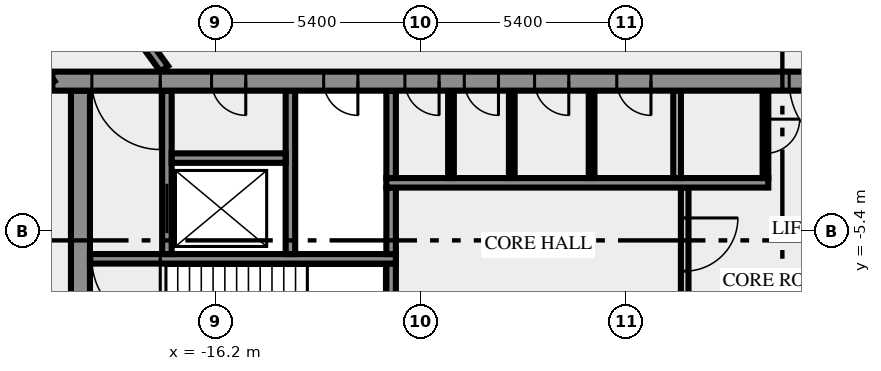
"""IFC4 building model, lengths in metres.
Left out: names, types, materials, properties, quantities, classifications, styles, units other than length and angle.
Written with IfcOpenShell. Run it as: python <this file> out.ifc"""

import sys

from ifc_helpers import new_model, si_unit, direction, frame, frame_2d, origin, place, context, subcontext, project, spatial, rectangle, extrude, element, fill, save


model = new_model("IFC4")
c1 = context("Model", 3, precision=1e-05, world=origin(), true_north=direction((0.0, 1.0)))
c2 = subcontext(c1, "Body", "Model", "MODEL_VIEW")
j1 = project(units=[si_unit("LENGTHUNIT", "METRE"), si_unit("PLANEANGLEUNIT", "RADIAN")], contexts=[c1])
p1 = place(None, origin())
s1 = spatial("IfcSite", under=j1, at=p1, CompositionType="ELEMENT")
p2 = place(p1, origin())
s2 = spatial("IfcBuilding", under=s1, at=p2, CompositionType="ELEMENT")
p3 = place(p2, frame((0.0, 0.0, 184.0)))
s3 = spatial("IfcBuildingStorey", under=s2, at=p3, CompositionType="ELEMENT", Elevation=184.0)
p4 = place(p3, frame((-19.75, -10.5, 0.0), z_axis=(0.0, 0.0, 1.0), x_axis=(0.0, 1.0, 0.0)))
e1 = element("IfcWall", 1, at=p4, inside=s3, PredefinedType="SHEAR", context=c2, shape_type="SweptSolid", body=[
    extrude(rectangle(XDim=8.8, YDim=0.5, at=frame_2d((4.4, 0.0))), origin(), (0.0, 0.0, 1.0), 3.4),
])
p5 = place(p3, frame((-11.575, -7.25, 0.0), z_axis=(0.0, 0.0, 1.0), x_axis=(0.0, 1.0, 0.0)))
e2 = element("IfcWall", 2, at=p5, inside=s3, PredefinedType="SHEAR", context=c2, shape_type="SweptSolid", body=[
    extrude(rectangle(XDim=1.0, YDim=0.25, at=frame_2d((0.5, 0.0))), origin(), (0.0, 0.0, 1.0), 3.4),
])
p6 = place(p3, frame((-3.85, -4.25, 0.0), z_axis=(0.0, 0.0, 1.0), x_axis=(0.0, -1.0, 0.0)))
e3 = element("IfcWall", 3, at=p6, inside=s3, PredefinedType="SOLIDWALL", context=c2, shape_type="SweptSolid", body=[
    extrude(rectangle(XDim=3.0, YDim=0.2, at=frame_2d((1.5, 0.0))), origin(), (0.0, 0.0, 1.0), 3.4),
])
p7 = place(p6, frame((0.8, 0.0, 0.0)))
e4 = element("IfcOpeningElement", 4, at=p7, cuts=e3, PredefinedType="OPENING", context=c2, shape_type="SweptSolid", body=[
    extrude(rectangle(XDim=1.4, YDim=2.1, at=frame_2d((0.7, 1.05))), frame((0.0, 0.11, 0.0), z_axis=(0.0, -1.0, 0.0), x_axis=(1.0, 0.0, 0.0)), (0.0, 0.0, 1.0), 0.22),
])
p8 = place(p3, frame((-11.45, -6.125, 0.0), z_axis=(0.0, 0.0, 1.0), x_axis=(-1.0, 0.0, 0.0)))
e5 = element("IfcWall", 5, at=p8, inside=s3, PredefinedType="SHEAR", context=c2, shape_type="SweptSolid", body=[
    extrude(rectangle(XDim=8.05, YDim=0.25, at=frame_2d((4.025, 0.0))), origin(), (0.0, 0.0, 1.0), 3.4),
])
p9 = place(p8, frame((6.2, 0.0, 0.0)))
e6 = element("IfcOpeningElement", 6, at=p9, cuts=e5, PredefinedType="OPENING", context=c2, shape_type="SweptSolid", body=[
    extrude(rectangle(XDim=1.8, YDim=2.1, at=frame_2d((0.9, 1.05))), frame((0.0, 0.135, 0.0), z_axis=(0.0, -1.0, 0.0), x_axis=(1.0, 0.0, 0.0)), (0.0, 0.0, 1.0), 0.27),
])
p10 = place(p3, frame((-17.475, -6.0, 0.0), z_axis=(0.0, 0.0, 1.0), x_axis=(0.0, 1.0, 0.0)))
e7 = element("IfcWall", 7, at=p10, inside=s3, PredefinedType="SHEAR", context=c2, shape_type="SweptSolid", body=[
    extrude(rectangle(XDim=4.3, YDim=0.25, at=frame_2d((2.15, 0.0))), origin(), (0.0, 0.0, 1.0), 3.4),
])
p11 = place(p10, frame((0.55, 0.0, 0.0)))
e8 = element("IfcOpeningElement", 8, at=p11, cuts=e7, PredefinedType="OPENING", context=c2, shape_type="SweptSolid", body=[
    extrude(rectangle(XDim=1.3, YDim=2.1, at=frame_2d((0.65, 1.05))), frame((0.0, 0.135, 0.0), z_axis=(0.0, -1.0, 0.0), x_axis=(1.0, 0.0, 0.0)), (0.0, 0.0, 1.0), 0.27),
])
p12 = place(p3, frame((-14.225, -6.0, 0.0), z_axis=(0.0, 0.0, 1.0), x_axis=(0.0, 1.0, 0.0)))
e9 = element("IfcWall", 9, at=p12, inside=s3, PredefinedType="SHEAR", context=c2, shape_type="SweptSolid", body=[
    extrude(rectangle(XDim=4.3, YDim=0.25, at=frame_2d((2.15, 0.0))), origin(), (0.0, 0.0, 1.0), 3.4),
])
p13 = place(p3, frame((-11.575, -6.0, 0.0), z_axis=(0.0, 0.0, 1.0), x_axis=(0.0, 1.0, 0.0)))
e10 = element("IfcWall", 10, at=p13, inside=s3, PredefinedType="SHEAR", context=c2, shape_type="SweptSolid", body=[
    extrude(rectangle(XDim=1.75, YDim=0.25, at=frame_2d((0.875, 0.0))), origin(), (0.0, 0.0, 1.0), 3.4),
])
p14 = place(p3, frame((-11.7, -4.125, 0.0), z_axis=(0.0, 0.0, 1.0), x_axis=(1.0, 0.0, 0.0)))
e11 = element("IfcWall", 11, at=p14, inside=s3, PredefinedType="SHEAR", context=c2, shape_type="SweptSolid", body=[
    extrude(rectangle(XDim=10.05, YDim=0.25, at=frame_2d((5.025, 0.0))), origin(), (0.0, 0.0, 1.0), 3.4),
])
p15 = place(p3, frame((-11.575, -4.0, 0.0), z_axis=(0.0, 0.0, 1.0), x_axis=(0.0, 1.0, 0.0)))
e12 = element("IfcWall", 12, at=p15, inside=s3, PredefinedType="SHEAR", context=c2, shape_type="SweptSolid", body=[
    extrude(rectangle(XDim=2.3, YDim=0.25, at=frame_2d((1.15, 0.0))), origin(), (0.0, 0.0, 1.0), 3.4),
])
for number, where, z_axis, x_axis in (
    (13, (-10.0, -4.0, 0.0), (0.0, 0.0, 1.0), (0.0, 1.0, 0.0)),
    (14, (-8.4, -4.0, 0.0), (0.0, 0.0, 1.0), (0.0, 1.0, 0.0)),
    (15, (-6.3, -4.0, 0.0), (0.0, 0.0, 1.0), (0.0, 1.0, 0.0)),
):
    element("IfcWall", number, at=place(p3, frame(where, z_axis=z_axis, x_axis=x_axis)), inside=s3, PredefinedType="PARTITIONING", context=c2, shape_type="SweptSolid", body=[
        extrude(rectangle(XDim=2.3, YDim=0.15, at=frame_2d((1.15, 0.0))), origin(), (0.0, 0.0, 1.0), 3.4),
    ])
p16 = place(p3, frame((-4.05, -4.0, 0.0), z_axis=(0.0, 0.0, 1.0), x_axis=(0.0, 1.0, 0.0)))
e16 = element("IfcWall", 16, at=p16, inside=s3, PredefinedType="SOLIDWALL", context=c2, shape_type="SweptSolid", body=[
    extrude(rectangle(XDim=2.3, YDim=0.2, at=frame_2d((1.15, 0.0))), origin(), (0.0, 0.0, 1.0), 3.4),
])
p17 = place(p3, frame((-1.725, -1.7, 0.0), z_axis=(0.0, 0.0, 1.0), x_axis=(0.0, -1.0, 0.0)))
e17 = element("IfcWall", 17, at=p17, inside=s3, PredefinedType="PARTITIONING", context=c2, shape_type="SweptSolid", body=[
    extrude(rectangle(XDim=2.3, YDim=0.15, at=frame_2d((1.15, 0.0))), origin(), (0.0, 0.0, 1.0), 3.4),
])
p18 = place(p17, frame((0.75, 0.0, 0.0)))
e18 = element("IfcOpeningElement", 18, at=p18, cuts=e17, PredefinedType="OPENING", context=c2, shape_type="SweptSolid", body=[
    extrude(rectangle(XDim=0.9, YDim=2.1, at=frame_2d((0.45, 1.05))), frame((0.0, 0.085, 0.0), z_axis=(0.0, -1.0, 0.0), x_axis=(1.0, 0.0, 0.0)), (0.0, 0.0, 1.0), 0.17),
])
p19 = place(p3, frame((-17.35, -3.475, 0.0), z_axis=(0.0, 0.0, 1.0), x_axis=(1.0, 0.0, 0.0)))
e19 = element("IfcWall", 19, at=p19, inside=s3, PredefinedType="SHEAR", context=c2, shape_type="SweptSolid", body=[
    extrude(rectangle(XDim=3.0, YDim=0.25, at=frame_2d((1.5, 0.0))), origin(), (0.0, 0.0, 1.0), 3.4),
])
p20 = place(p3, frame((20.49, -1.45, 0.0), z_axis=(0.0, 0.0, 1.0), x_axis=(-1.0, 0.0, 0.0)))
e20 = element("IfcWall", 20, at=p20, inside=s3, PredefinedType="SHEAR", context=c2, shape_type="SweptSolid", body=[
    extrude(rectangle(XDim=40.98, YDim=0.5, at=frame_2d((20.49, 0.0))), origin(), (0.0, 0.0, 1.0), 3.4),
])
p21 = place(p20, frame((38.14, 0.0, 0.0)))
e21 = element("IfcOpeningElement", 21, at=p21, cuts=e20, PredefinedType="OPENING", context=c2, shape_type="SweptSolid", body=[
    extrude(rectangle(XDim=1.8, YDim=2.1, at=frame_2d((0.9, 1.05))), frame((0.0, 0.26, 0.0), z_axis=(0.0, -1.0, 0.0), x_axis=(1.0, 0.0, 0.0)), (0.0, 0.0, 1.0), 0.52),
])
p22 = place(p20, frame((35.89, 0.0, 0.0)))
e22 = element("IfcOpeningElement", 22, at=p22, cuts=e20, PredefinedType="OPENING", context=c2, shape_type="SweptSolid", body=[
    extrude(rectangle(XDim=0.9, YDim=2.1, at=frame_2d((0.45, 1.05))), frame((0.0, 0.26, 0.0), z_axis=(0.0, -1.0, 0.0), x_axis=(1.0, 0.0, 0.0)), (0.0, 0.0, 1.0), 0.52),
])
p23 = place(p20, frame((32.94, 0.0, 0.0)))
e23 = element("IfcOpeningElement", 23, at=p23, cuts=e20, PredefinedType="OPENING", context=c2, shape_type="SweptSolid", body=[
    extrude(rectangle(XDim=0.9, YDim=2.1, at=frame_2d((0.45, 1.05))), frame((0.0, 0.26, 0.0), z_axis=(0.0, -1.0, 0.0), x_axis=(1.0, 0.0, 0.0)), (0.0, 0.0, 1.0), 0.52),
])
p24 = place(p20, frame((30.802, 0.0, 0.0)))
e24 = element("IfcOpeningElement", 24, at=p24, cuts=e20, PredefinedType="OPENING", context=c2, shape_type="SweptSolid", body=[
    extrude(rectangle(XDim=0.9, YDim=2.1, at=frame_2d((0.45, 1.05))), frame((0.0, 0.26, 0.0), z_axis=(0.0, -1.0, 0.0), x_axis=(1.0, 0.0, 0.0)), (0.0, 0.0, 1.0), 0.52),
])
p25 = place(p20, frame((29.24, 0.0, 0.0)))
e25 = element("IfcOpeningElement", 25, at=p25, cuts=e20, PredefinedType="OPENING", context=c2, shape_type="SweptSolid", body=[
    extrude(rectangle(XDim=0.9, YDim=2.1, at=frame_2d((0.45, 1.05))), frame((0.0, 0.26, 0.0), z_axis=(0.0, -1.0, 0.0), x_axis=(1.0, 0.0, 0.0)), (0.0, 0.0, 1.0), 0.52),
])
p26 = place(p20, frame((27.39, 0.0, 0.0)))
e26 = element("IfcOpeningElement", 26, at=p26, cuts=e20, PredefinedType="OPENING", context=c2, shape_type="SweptSolid", body=[
    extrude(rectangle(XDim=0.9, YDim=2.1, at=frame_2d((0.45, 1.05))), frame((0.0, 0.26, 0.0), z_axis=(0.0, -1.0, 0.0), x_axis=(1.0, 0.0, 0.0)), (0.0, 0.0, 1.0), 0.52),
])
p27 = place(p20, frame((25.228, 0.0, 0.0)))
e27 = element("IfcOpeningElement", 27, at=p27, cuts=e20, PredefinedType="OPENING", context=c2, shape_type="SweptSolid", body=[
    extrude(rectangle(XDim=0.9, YDim=2.1, at=frame_2d((0.45, 1.05))), frame((0.0, 0.26, 0.0), z_axis=(0.0, -1.0, 0.0), x_axis=(1.0, 0.0, 0.0)), (0.0, 0.0, 1.0), 0.52),
])
p28 = place(p20, frame((19.59, 0.0, 0.0)))
e28 = element("IfcOpeningElement", 28, at=p28, cuts=e20, PredefinedType="OPENING", context=c2, shape_type="SweptSolid", body=[
    extrude(rectangle(XDim=2.0, YDim=2.1, at=frame_2d((1.0, 1.05))), frame((0.0, 0.26, 0.0), z_axis=(0.0, -1.0, 0.0), x_axis=(1.0, 0.0, 0.0)), (0.0, 0.0, 1.0), 0.52),
])
p29 = place(p20, frame((7.14, 0.0, 0.0)))
e29 = element("IfcOpeningElement", 29, at=p29, cuts=e20, PredefinedType="OPENING", context=c2, shape_type="SweptSolid", body=[
    extrude(rectangle(XDim=0.9, YDim=2.1, at=frame_2d((0.45, 1.05))), frame((0.0, 0.26, 0.0), z_axis=(0.0, -1.0, 0.0), x_axis=(1.0, 0.0, 0.0)), (0.0, 0.0, 1.0), 0.52),
])
p30 = place(p20, frame((5.028, 0.0, 0.0)))
e30 = element("IfcOpeningElement", 30, at=p30, cuts=e20, PredefinedType="OPENING", context=c2, shape_type="SweptSolid", body=[
    extrude(rectangle(XDim=0.8, YDim=2.1, at=frame_2d((0.4, 1.05))), frame((0.0, 0.26, 0.0), z_axis=(0.0, -1.0, 0.0), x_axis=(1.0, 0.0, 0.0)), (0.0, 0.0, 1.0), 0.52),
])
p31 = place(p20, frame((3.452, 0.0, 0.0)))
e31 = element("IfcOpeningElement", 31, at=p31, cuts=e20, PredefinedType="OPENING", context=c2, shape_type="SweptSolid", body=[
    extrude(rectangle(XDim=0.8, YDim=2.1, at=frame_2d((0.4, 1.05))), frame((0.0, 0.26, 0.0), z_axis=(0.0, -1.0, 0.0), x_axis=(1.0, 0.0, 0.0)), (0.0, 0.0, 1.0), 0.52),
])
p32 = place(p20, frame((1.04, 0.0, 0.0)))
e32 = element("IfcOpeningElement", 32, at=p32, cuts=e20, PredefinedType="OPENING", context=c2, shape_type="SweptSolid", body=[
    extrude(rectangle(XDim=1.8, YDim=2.1, at=frame_2d((0.9, 1.05))), frame((0.0, 0.26, 0.0), z_axis=(0.0, -1.0, 0.0), x_axis=(1.0, 0.0, 0.0)), (0.0, 0.0, 1.0), 0.52),
])
p33 = place(p3, frame((-20.531, -1.523, 0.0), z_axis=(0.0, 0.0, 1.0), x_axis=(-0.587784239999, 0.809017729849, 0.0)))
e33 = element("IfcWall", 33, at=p33, inside=s3, PredefinedType="SOLIDWALL", context=c2, shape_type="SweptSolid", body=[
    extrude(rectangle(XDim=23.271, YDim=0.25, at=frame_2d((11.635, 0.0))), origin(), (0.0, 0.0, 1.0), 3.4),
])
p34 = place(p33, frame((15.916, 0.0, 0.0)))
e34 = element("IfcOpeningElement", 34, at=p34, cuts=e33, PredefinedType="OPENING", context=c2, shape_type="SweptSolid", body=[
    extrude(rectangle(XDim=0.9, YDim=2.1, at=frame_2d((0.45, 1.05))), frame((0.0, 0.135, 0.0), z_axis=(0.0, -1.0, 0.0), x_axis=(1.0, 0.0, 0.0)), (0.0, 0.0, 1.0), 0.27),
])
p35 = place(p33, frame((6.974, 0.0, 0.0)))
e35 = element("IfcOpeningElement", 35, at=p35, cuts=e33, PredefinedType="OPENING", context=c2, shape_type="SweptSolid", body=[
    extrude(rectangle(XDim=1.8, YDim=2.1, at=frame_2d((0.9, 1.05))), frame((0.0, 0.135, 0.0), z_axis=(0.0, -1.0, 0.0), x_axis=(1.0, 0.0, 0.0)), (0.0, 0.0, 1.0), 0.27),
])
p36 = place(p3, frame((-31.918, 18.658, 0.0), z_axis=(0.0, 0.0, 1.0), x_axis=(0.587788731405, -0.80901446664, 0.0)))
e36 = element("IfcWall", 36, at=p36, inside=s3, PredefinedType="SOLIDWALL", context=c2, shape_type="SweptSolid", body=[
    extrude(rectangle(XDim=24.453, YDim=0.25, at=frame_2d((12.227, 0.0))), origin(), (0.0, 0.0, 1.0), 3.4),
])
p37 = place(p36, frame((0.224, 0.0, 0.0)))
e37 = element("IfcOpeningElement", 37, at=p37, cuts=e36, PredefinedType="OPENING", context=c2, shape_type="SweptSolid", body=[
    extrude(rectangle(XDim=0.9, YDim=2.1, at=frame_2d((0.45, 1.05))), frame((0.0, 0.135, 0.0), z_axis=(0.0, -1.0, 0.0), x_axis=(1.0, 0.0, 0.0)), (0.0, 0.0, 1.0), 0.27),
])
p38 = place(p36, frame((7.395, 0.0, 0.0)))
e38 = element("IfcOpeningElement", 38, at=p38, cuts=e36, PredefinedType="OPENING", context=c2, shape_type="SweptSolid", body=[
    extrude(rectangle(XDim=0.9, YDim=2.1, at=frame_2d((0.45, 1.05))), frame((0.0, 0.135, 0.0), z_axis=(0.0, -1.0, 0.0), x_axis=(1.0, 0.0, 0.0)), (0.0, 0.0, 1.0), 0.27),
])
p39 = place(p7, origin())
e39 = element("IfcDoor", 39, at=p39, inside=s3, OperationType="DOUBLE_DOOR_SINGLE_SWING", PredefinedType="DOOR", context=c2, shape_type="SweptSolid", body=[
    extrude(rectangle(XDim=1.4, YDim=2.1, at=frame_2d((0.7, 1.05))), frame((0.0, 0.025, 0.0), z_axis=(0.0, -1.0, 0.0), x_axis=(1.0, 0.0, 0.0)), (0.0, 0.0, 1.0), 0.05),
])
fill(e4, e39)
p40 = place(p9, origin())
e40 = element("IfcDoor", 40, at=p40, inside=s3, OperationType="DOUBLE_DOOR_SINGLE_SWING", PredefinedType="DOOR", context=c2, shape_type="SweptSolid", body=[
    extrude(rectangle(XDim=1.8, YDim=2.1, at=frame_2d((0.9, 1.05))), frame((0.0, 0.025, 0.0), z_axis=(0.0, -1.0, 0.0), x_axis=(1.0, 0.0, 0.0)), (0.0, 0.0, 1.0), 0.05),
])
fill(e6, e40)
p41 = place(p11, origin())
e41 = element("IfcDoor", 41, at=p41, inside=s3, OperationType="DOUBLE_DOOR_SLIDING", PredefinedType="DOOR", context=c2, shape_type="SweptSolid", body=[
    extrude(rectangle(XDim=1.3, YDim=2.1, at=frame_2d((0.65, 1.05))), frame((0.0, 0.025, 0.0), z_axis=(0.0, -1.0, 0.0), x_axis=(1.0, 0.0, 0.0)), (0.0, 0.0, 1.0), 0.05),
])
fill(e8, e41)
p42 = place(p18, origin())
e42 = element("IfcDoor", 42, at=p42, inside=s3, OperationType="SINGLE_SWING_RIGHT", PredefinedType="DOOR", context=c2, shape_type="SweptSolid", body=[
    extrude(rectangle(XDim=0.9, YDim=2.1, at=frame_2d((0.45, 1.05))), frame((0.0, 0.025, 0.0), z_axis=(0.0, -1.0, 0.0), x_axis=(1.0, 0.0, 0.0)), (0.0, 0.0, 1.0), 0.05),
])
fill(e18, e42)
p43 = place(p21, origin())
e43 = element("IfcDoor", 43, at=p43, inside=s3, OperationType="DOUBLE_DOOR_SINGLE_SWING", PredefinedType="DOOR", context=c2, shape_type="SweptSolid", body=[
    extrude(rectangle(XDim=1.8, YDim=2.1, at=frame_2d((0.9, 1.05))), frame((0.0, 0.025, 0.0), z_axis=(0.0, -1.0, 0.0), x_axis=(1.0, 0.0, 0.0)), (0.0, 0.0, 1.0), 0.05),
])
fill(e21, e43)
p44 = place(p22, origin())
e44 = element("IfcDoor", 44, at=p44, inside=s3, OperationType="SINGLE_SWING_RIGHT", PredefinedType="DOOR", context=c2, shape_type="SweptSolid", body=[
    extrude(rectangle(XDim=0.9, YDim=2.1, at=frame_2d((0.45, 1.05))), frame((0.0, 0.025, 0.0), z_axis=(0.0, -1.0, 0.0), x_axis=(1.0, 0.0, 0.0)), (0.0, 0.0, 1.0), 0.05),
])
fill(e22, e44)
p45 = place(p23, origin())
e45 = element("IfcDoor", 45, at=p45, inside=s3, OperationType="SINGLE_SWING_RIGHT", PredefinedType="DOOR", context=c2, shape_type="SweptSolid", body=[
    extrude(rectangle(XDim=0.9, YDim=2.1, at=frame_2d((0.45, 1.05))), frame((0.0, 0.025, 0.0), z_axis=(0.0, -1.0, 0.0), x_axis=(1.0, 0.0, 0.0)), (0.0, 0.0, 1.0), 0.05),
])
fill(e23, e45)
p46 = place(p24, origin())
e46 = element("IfcDoor", 46, at=p46, inside=s3, OperationType="SINGLE_SWING_RIGHT", PredefinedType="DOOR", context=c2, shape_type="SweptSolid", body=[
    extrude(rectangle(XDim=0.9, YDim=2.1, at=frame_2d((0.45, 1.05))), frame((0.0, 0.025, 0.0), z_axis=(0.0, -1.0, 0.0), x_axis=(1.0, 0.0, 0.0)), (0.0, 0.0, 1.0), 0.05),
])
fill(e24, e46)
p47 = place(p25, origin())
e47 = element("IfcDoor", 47, at=p47, inside=s3, OperationType="SINGLE_SWING_RIGHT", PredefinedType="DOOR", context=c2, shape_type="SweptSolid", body=[
    extrude(rectangle(XDim=0.9, YDim=2.1, at=frame_2d((0.45, 1.05))), frame((0.0, 0.025, 0.0), z_axis=(0.0, -1.0, 0.0), x_axis=(1.0, 0.0, 0.0)), (0.0, 0.0, 1.0), 0.05),
])
fill(e25, e47)
p48 = place(p26, origin())
e48 = element("IfcDoor", 48, at=p48, inside=s3, OperationType="SINGLE_SWING_RIGHT", PredefinedType="DOOR", context=c2, shape_type="SweptSolid", body=[
    extrude(rectangle(XDim=0.9, YDim=2.1, at=frame_2d((0.45, 1.05))), frame((0.0, 0.025, 0.0), z_axis=(0.0, -1.0, 0.0), x_axis=(1.0, 0.0, 0.0)), (0.0, 0.0, 1.0), 0.05),
])
fill(e26, e48)
p49 = place(p27, origin())
e49 = element("IfcDoor", 49, at=p49, inside=s3, OperationType="SINGLE_SWING_RIGHT", PredefinedType="DOOR", context=c2, shape_type="SweptSolid", body=[
    extrude(rectangle(XDim=0.9, YDim=2.1, at=frame_2d((0.45, 1.05))), frame((0.0, 0.025, 0.0), z_axis=(0.0, -1.0, 0.0), x_axis=(1.0, 0.0, 0.0)), (0.0, 0.0, 1.0), 0.05),
])
fill(e27, e49)
p50 = place(p28, origin())
e50 = element("IfcDoor", 50, at=p50, inside=s3, OperationType="DOUBLE_DOOR_SINGLE_SWING", PredefinedType="DOOR", context=c2, shape_type="SweptSolid", body=[
    extrude(rectangle(XDim=2.0, YDim=2.1, at=frame_2d((1.0, 1.05))), frame((0.0, 0.025, 0.0), z_axis=(0.0, -1.0, 0.0), x_axis=(1.0, 0.0, 0.0)), (0.0, 0.0, 1.0), 0.05),
])
fill(e28, e50)
save(model, sys.argv[1])
